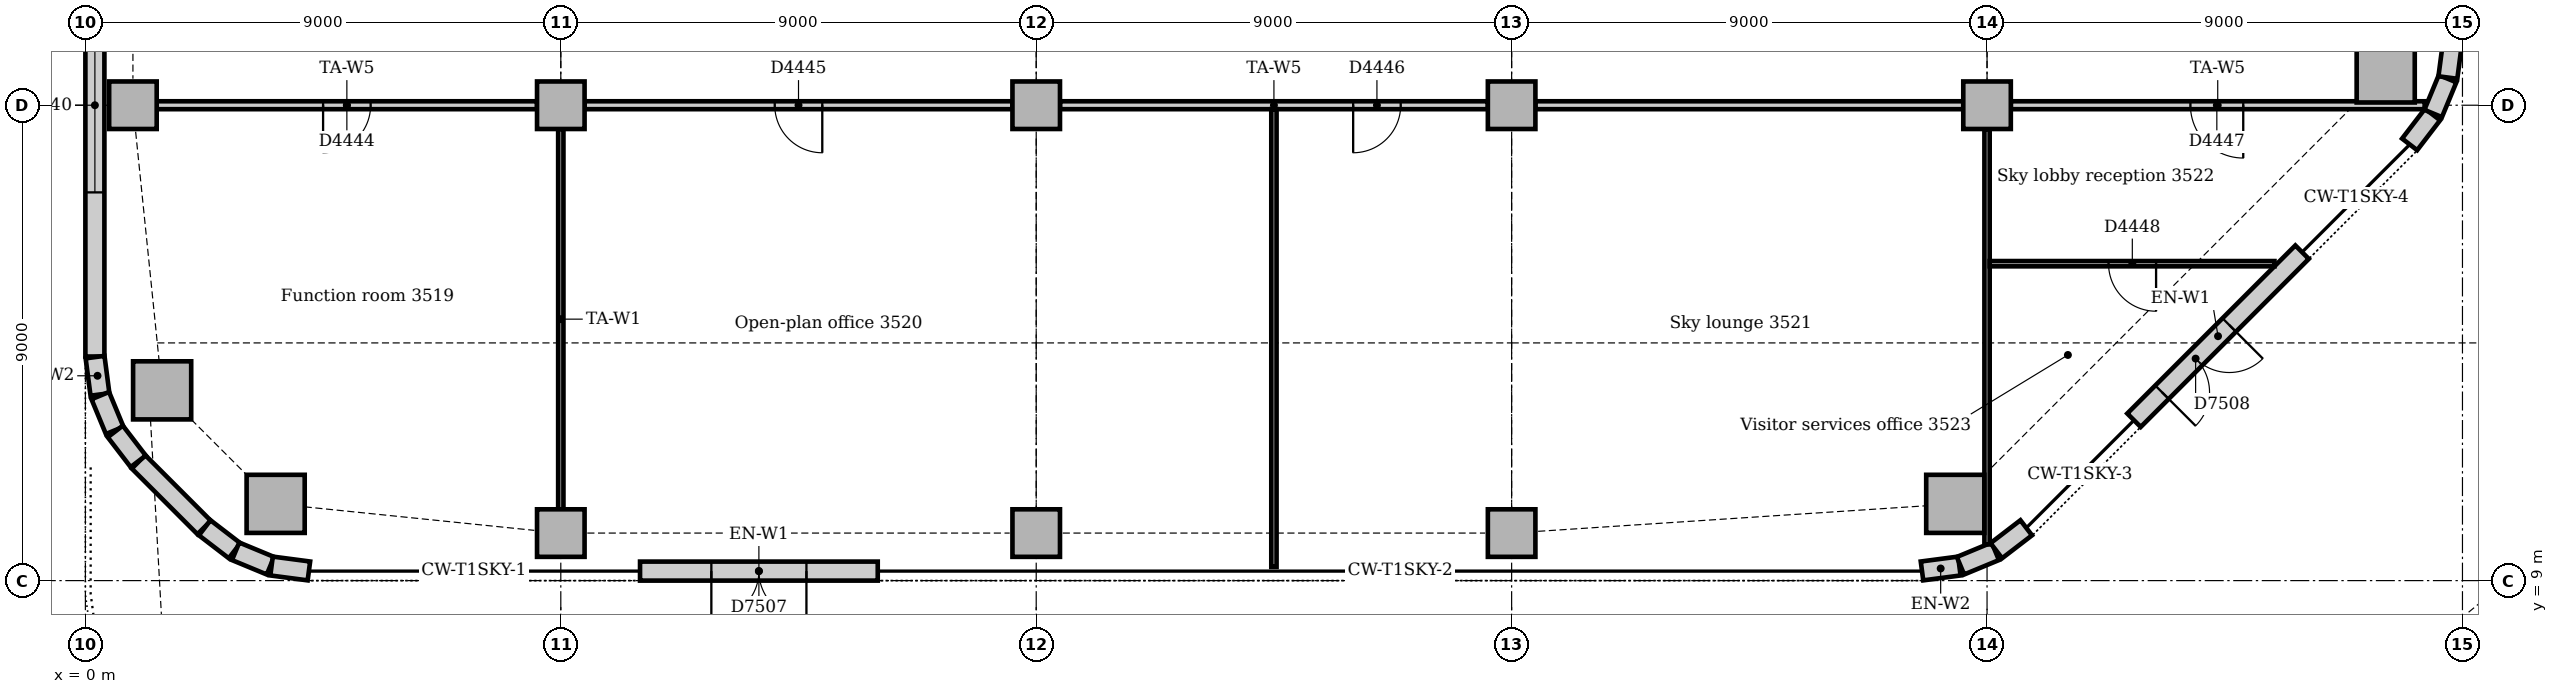
"""IFC4 building model, lengths in metres.
Left out: names, types, materials, properties, quantities, classifications, styles, units other than length and angle.
Written with IfcOpenShell. Run it as: python <this file> out.ifc"""

import sys

from ifc_helpers import new_model, si_unit, direction, frame, frame_2d, origin, origin_2d, place, context, subcontext, project, spatial, rectangle, extrude, element, fill, save


model = new_model("IFC4")
c1 = context("Model", 3, precision=1e-05, world=origin(), true_north=direction((0.0, 1.0)))
c2 = subcontext(c1, "Body", "Model", "MODEL_VIEW")
j1 = project(units=[si_unit("LENGTHUNIT", "METRE"), si_unit("PLANEANGLEUNIT", "RADIAN")], contexts=[c1])
p1 = place(None, origin())
s1 = spatial("IfcSite", under=j1, at=p1, CompositionType="ELEMENT")
p2 = place(p1, origin())
s2 = spatial("IfcBuilding", under=s1, at=p2, CompositionType="ELEMENT")
p3 = place(p2, frame((0.0, 0.0, 149.0)))
s3 = spatial("IfcBuildingStorey", under=s2, at=p3, CompositionType="ELEMENT", Elevation=149.0)
for number, where, z_axis, x_axis in (
    (1, (3.602, 10.453, -0.15), (0.0, 0.0, 1.0), (1.0, 0.0, 0.0)),
    (2, (35.398, 10.453, -0.15), (0.0, 0.0, 1.0), (1.0, 0.0, 0.0)),
    (3, (43.547, 18.602, -0.15), (0.0, 0.0, 1.0), (1.0, 0.0, 0.0)),
    (4, (1.453, 12.602, -0.15), (0.0, 0.0, 1.0), (1.0, 0.0, 0.0)),
):
    element("IfcColumn", number, at=place(p3, frame(where, z_axis=z_axis, x_axis=x_axis)), inside=s3, PredefinedType="COLUMN", context=c2, shape_type="SweptSolid", body=[
        extrude(rectangle(XDim=1.1, YDim=1.1, at=origin_2d()), origin(), (0.0, 0.0, 1.0), 4.0),
    ])
for number, where, z_axis, x_axis in (
    (5, (9.0, 9.9, -0.15), (0.0, 0.0, 1.0), (1.0, 0.0, 0.0)),
    (6, (18.0, 9.9, -0.15), (0.0, 0.0, 1.0), (1.0, 0.0, 0.0)),
    (7, (27.0, 9.9, -0.15), (0.0, 0.0, 1.0), (1.0, 0.0, 0.0)),
):
    element("IfcColumn", number, at=place(p3, frame(where, z_axis=z_axis, x_axis=x_axis)), inside=s3, PredefinedType="COLUMN", context=c2, shape_type="SweptSolid", body=[
        extrude(rectangle(XDim=0.9, YDim=0.9, at=origin_2d()), origin(), (0.0, 0.0, 1.0), 4.0),
    ])
for number, where, z_axis, x_axis in (
    (8, (0.9, 18.0, 0.0), (0.0, 0.0, 1.0), (1.0, 0.0, 0.0)),
    (9, (9.0, 18.0, 0.0), (0.0, 0.0, 1.0), (1.0, 0.0, 0.0)),
    (10, (18.0, 18.0, 0.0), (0.0, 0.0, 1.0), (1.0, 0.0, 0.0)),
    (11, (27.0, 18.0, 0.0), (0.0, 0.0, 1.0), (1.0, 0.0, 0.0)),
    (12, (36.0, 18.0, 0.0), (0.0, 0.0, 1.0), (1.0, 0.0, 0.0)),
):
    element("IfcColumn", number, at=place(p3, frame(where, z_axis=z_axis, x_axis=x_axis)), inside=s3, PredefinedType="COLUMN", context=c2, shape_type="SweptSolid", body=[
        extrude(rectangle(XDim=0.9, YDim=0.9, at=origin_2d()), origin(), (0.0, 0.0, 1.0), 3.85),
    ])
p4 = place(p3, frame((10.5, 9.18, 0.0), z_axis=(0.0, 0.0, 1.0), x_axis=(1.0, 0.0, 0.0)))
e13 = element("IfcWall", 13, at=p4, inside=s3, PredefinedType="STANDARD", context=c2, shape_type="SweptSolid", body=[
    extrude(rectangle(XDim=4.5, YDim=0.36, at=frame_2d((2.25, 0.0))), origin(), (0.0, 0.0, 1.0), 3.85),
])
p5 = place(p4, frame((1.35, 0.0, 0.0)))
e14 = element("IfcOpeningElement", 14, at=p5, cuts=e13, PredefinedType="OPENING", context=c2, shape_type="SweptSolid", body=[
    extrude(rectangle(XDim=1.8, YDim=2.4, at=frame_2d((0.9, 1.2))), frame((0.0, 0.19, 0.0), z_axis=(0.0, -1.0, 0.0), x_axis=(1.0, 0.0, 0.0)), (0.0, 0.0, 1.0), 0.38),
])
p6 = place(p3, frame((38.782, 12.036, 0.0), z_axis=(0.0, 0.0, 1.0), x_axis=(0.707106781187, 0.707106781187, 0.0)))
e15 = element("IfcWall", 15, at=p6, inside=s3, PredefinedType="STANDARD", context=c2, shape_type="SweptSolid", body=[
    extrude(rectangle(XDim=4.5, YDim=0.36, at=frame_2d((2.25, 0.0))), origin(), (0.0, 0.0, 1.0), 3.85),
])
p7 = place(p6, frame((0.75, 0.0, 0.0)))
e16 = element("IfcOpeningElement", 16, at=p7, cuts=e15, PredefinedType="OPENING", context=c2, shape_type="SweptSolid", body=[
    extrude(rectangle(XDim=1.8, YDim=2.4, at=frame_2d((0.9, 1.2))), frame((0.0, 0.19, 0.0), z_axis=(0.0, -1.0, 0.0), x_axis=(1.0, 0.0, 0.0)), (0.0, 0.0, 1.0), 0.38),
])
p8 = place(p3, frame((0.18, 21.0, 0.0), z_axis=(0.0, 0.0, 1.0), x_axis=(0.0, -1.0, 0.0)))
e17 = element("IfcWall", 17, at=p8, inside=s3, PredefinedType="STANDARD", context=c2, shape_type="SweptSolid", body=[
    extrude(rectangle(XDim=7.757, YDim=0.36, at=frame_2d((3.879, 0.0))), origin(), (0.0, 0.0, 1.0), 3.85),
])
p9 = place(p8, frame((1.35, 0.0, 0.9)))
e18 = element("IfcOpeningElement", 18, at=p9, cuts=e17, PredefinedType="OPENING", context=c2, shape_type="SweptSolid", body=[
    extrude(rectangle(XDim=3.3, YDim=1.6, at=frame_2d((1.65, 0.8))), frame((0.0, 0.19, 0.0), z_axis=(0.0, -1.0, 0.0), x_axis=(1.0, 0.0, 0.0)), (0.0, 0.0, 1.0), 0.38),
])
p10 = place(p3, frame((1.006, 11.249, 0.0), z_axis=(0.0, 0.0, 1.0), x_axis=(0.707106781187, -0.707106781187, 0.0)))
e19 = element("IfcWall", 19, at=p10, inside=s3, PredefinedType="STANDARD", context=c2, shape_type="SweptSolid", body=[
    extrude(rectangle(XDim=1.757, YDim=0.36, at=frame_2d((0.879, 0.0))), origin(), (0.0, 0.0, 1.0), 3.85),
])
for number, where, z_axis, x_axis in (
    (20, (34.769, 9.183, 0.0), (0.0, 0.0, 1.0), (0.991, 0.131, 0.0)),
    (21, (35.497, 9.282, 0.0), (0.0, 0.0, 1.0), (0.924, 0.383, 0.0)),
):
    element("IfcWall", number, at=place(p3, frame(where, z_axis=z_axis, x_axis=x_axis)), inside=s3, PredefinedType="STANDARD", context=c2, shape_type="SweptSolid", body=[
        extrude(rectangle(XDim=0.713, YDim=0.36, at=frame_2d((0.356, 0.0))), origin(), (0.0, 0.0, 1.0), 3.85),
    ])
for number, where, z_axis, x_axis in (
    (22, (36.175, 9.566, 0.0), (0.0, 0.0, 1.0), (0.793, 0.609, 0.0)),
    (23, (44.0, 17.259, 0.0), (0.0, 0.0, 1.0), (0.609, 0.793, 0.0)),
):
    element("IfcWall", number, at=place(p3, frame(where, z_axis=z_axis, x_axis=x_axis)), inside=s3, PredefinedType="STANDARD", context=c2, shape_type="SweptSolid", body=[
        extrude(rectangle(XDim=0.713, YDim=0.36, at=frame_2d((0.357, 0.0))), origin(), (0.0, 0.0, 1.0), 3.85),
    ])
for number, where, z_axis, x_axis in (
    (24, (44.445, 17.844, 0.0), (0.0, 0.0, 1.0), (0.383, 0.924, 0.0)),
    (25, (44.724, 18.524, 0.0), (0.0, 0.0, 1.0), (0.131, 0.991, 0.0)),
    (26, (0.183, 13.231, 0.0), (0.0, 0.0, 1.0), (0.131, -0.991, 0.0)),
    (27, (0.282, 12.503, 0.0), (0.0, 0.0, 1.0), (0.383, -0.924, 0.0)),
):
    element("IfcWall", number, at=place(p3, frame(where, z_axis=z_axis, x_axis=x_axis)), inside=s3, PredefinedType="STANDARD", context=c2, shape_type="SweptSolid", body=[
        extrude(rectangle(XDim=0.713, YDim=0.36, at=frame_2d((0.356, 0.0))), origin(), (0.0, 0.0, 1.0), 3.85),
    ])
for number, where, z_axis, x_axis in (
    (28, (0.566, 11.825, 0.0), (0.0, 0.0, 1.0), (0.609, -0.793, 0.0)),
    (29, (2.259, 10.0, 0.0), (0.0, 0.0, 1.0), (0.793, -0.609, 0.0)),
):
    element("IfcWall", number, at=place(p3, frame(where, z_axis=z_axis, x_axis=x_axis)), inside=s3, PredefinedType="STANDARD", context=c2, shape_type="SweptSolid", body=[
        extrude(rectangle(XDim=0.713, YDim=0.36, at=frame_2d((0.357, 0.0))), origin(), (0.0, 0.0, 1.0), 3.85),
    ])
for number, where, z_axis, x_axis in (
    (30, (2.844, 9.555, 0.0), (0.0, 0.0, 1.0), (0.924, -0.383, 0.0)),
    (31, (3.524, 9.276, 0.0), (0.0, 0.0, 1.0), (0.991, -0.131, 0.0)),
):
    element("IfcWall", number, at=place(p3, frame(where, z_axis=z_axis, x_axis=x_axis)), inside=s3, PredefinedType="STANDARD", context=c2, shape_type="SweptSolid", body=[
        extrude(rectangle(XDim=0.713, YDim=0.36, at=frame_2d((0.356, 0.0))), origin(), (0.0, 0.0, 1.0), 3.85),
    ])
p11 = place(p3, frame((1.35, 18.0, 0.0), z_axis=(0.0, 0.0, 1.0), x_axis=(1.0, 0.0, 0.0)))
e32 = element("IfcWall", 32, at=p11, inside=s3, PredefinedType="PARTITIONING", context=c2, shape_type="SweptSolid", body=[
    extrude(rectangle(XDim=7.2, YDim=0.15, at=frame_2d((3.6, 0.0))), origin(), (0.0, 0.0, 1.0), 3.262),
])
p12 = place(p11, frame((3.15, 0.0, 0.0)))
e33 = element("IfcOpeningElement", 33, at=p12, cuts=e32, PredefinedType="OPENING", context=c2, shape_type="SweptSolid", body=[
    extrude(rectangle(XDim=0.9, YDim=2.1, at=frame_2d((0.45, 1.05))), frame((0.0, 0.085, 0.0), z_axis=(0.0, -1.0, 0.0), x_axis=(1.0, 0.0, 0.0)), (0.0, 0.0, 1.0), 0.17),
])
p13 = place(p3, frame((9.45, 18.0, 0.0), z_axis=(0.0, 0.0, 1.0), x_axis=(1.0, 0.0, 0.0)))
e34 = element("IfcWall", 34, at=p13, inside=s3, PredefinedType="PARTITIONING", context=c2, shape_type="SweptSolid", body=[
    extrude(rectangle(XDim=8.1, YDim=0.15, at=frame_2d((4.05, 0.0))), origin(), (0.0, 0.0, 1.0), 3.262),
])
p14 = place(p13, frame((3.6, 0.0, 0.0)))
e35 = element("IfcOpeningElement", 35, at=p14, cuts=e34, PredefinedType="OPENING", context=c2, shape_type="SweptSolid", body=[
    extrude(rectangle(XDim=0.9, YDim=2.1, at=frame_2d((0.45, 1.05))), frame((0.0, 0.085, 0.0), z_axis=(0.0, -1.0, 0.0), x_axis=(1.0, 0.0, 0.0)), (0.0, 0.0, 1.0), 0.17),
])
p15 = place(p3, frame((18.45, 18.0, 0.0), z_axis=(0.0, 0.0, 1.0), x_axis=(1.0, 0.0, 0.0)))
e36 = element("IfcWall", 36, at=p15, inside=s3, PredefinedType="PARTITIONING", context=c2, shape_type="SweptSolid", body=[
    extrude(rectangle(XDim=8.1, YDim=0.15, at=frame_2d((4.05, 0.0))), origin(), (0.0, 0.0, 1.0), 3.262),
])
p16 = place(p15, frame((5.55, 0.0, 0.0)))
e37 = element("IfcOpeningElement", 37, at=p16, cuts=e36, PredefinedType="OPENING", context=c2, shape_type="SweptSolid", body=[
    extrude(rectangle(XDim=0.9, YDim=2.1, at=frame_2d((0.45, 1.05))), frame((0.0, 0.085, 0.0), z_axis=(0.0, -1.0, 0.0), x_axis=(1.0, 0.0, 0.0)), (0.0, 0.0, 1.0), 0.17),
])
p17 = place(p3, frame((27.45, 18.0, 0.0), z_axis=(0.0, 0.0, 1.0), x_axis=(1.0, 0.0, 0.0)))
e38 = element("IfcWall", 38, at=p17, inside=s3, PredefinedType="PARTITIONING", context=c2, shape_type="SweptSolid", body=[
    extrude(rectangle(XDim=8.1, YDim=0.15, at=frame_2d((4.05, 0.0))), origin(), (0.0, 0.0, 1.0), 3.262),
])
p18 = place(p3, frame((36.45, 18.0, 0.0), z_axis=(0.0, 0.0, 1.0), x_axis=(1.0, 0.0, 0.0)))
e39 = element("IfcWall", 39, at=p18, inside=s3, PredefinedType="PARTITIONING", context=c2, shape_type="SweptSolid", body=[
    extrude(rectangle(XDim=7.834, YDim=0.15, at=frame_2d((3.917, 0.0))), origin(), (0.0, 0.0, 1.0), 3.35),
])
p19 = place(p18, frame((3.4, 0.0, 0.0)))
e40 = element("IfcOpeningElement", 40, at=p19, cuts=e39, PredefinedType="OPENING", context=c2, shape_type="SweptSolid", body=[
    extrude(rectangle(XDim=1.0, YDim=2.1, at=frame_2d((0.5, 1.05))), frame((0.0, 0.085, 0.0), z_axis=(0.0, -1.0, 0.0), x_axis=(1.0, 0.0, 0.0)), (0.0, 0.0, 1.0), 0.17),
])
p20 = place(p3, frame((9.0, 10.35, 0.0), z_axis=(0.0, 0.0, 1.0), x_axis=(0.0, 1.0, 0.0)))
e41 = element("IfcWall", 41, at=p20, inside=s3, PredefinedType="PARTITIONING", context=c2, shape_type="SweptSolid", body=[
    extrude(rectangle(XDim=7.2, YDim=0.1, at=frame_2d((3.6, 0.0))), origin(), (0.0, 0.0, 1.0), 3.362),
])
p21 = place(p3, frame((22.5, 9.26, 0.0), z_axis=(0.0, 0.0, 1.0), x_axis=(0.0, 1.0, 0.0)))
e42 = element("IfcWall", 42, at=p21, inside=s3, PredefinedType="PARTITIONING", context=c2, shape_type="SweptSolid", body=[
    extrude(rectangle(XDim=8.665, YDim=0.1, at=frame_2d((4.332, 0.0))), origin(), (0.0, 0.0, 1.0), 3.85),
])
p22 = place(p3, frame((36.0, 9.685, 0.0), z_axis=(0.0, 0.0, 1.0), x_axis=(0.0, 1.0, 0.0)))
e43 = element("IfcWall", 43, at=p22, inside=s3, PredefinedType="PARTITIONING", context=c2, shape_type="SweptSolid", body=[
    extrude(rectangle(XDim=7.865, YDim=0.1, at=frame_2d((3.933, 0.0))), origin(), (0.0, 0.0, 1.0), 3.35),
])
p23 = place(p3, frame((36.05, 15.0, 0.0), z_axis=(0.0, 0.0, 1.0), x_axis=(1.0, 0.0, 0.0)))
e44 = element("IfcWall", 44, at=p23, inside=s3, PredefinedType="PARTITIONING", context=c2, shape_type="SweptSolid", body=[
    extrude(rectangle(XDim=5.391, YDim=0.1, at=frame_2d((2.696, 0.0))), origin(), (0.0, 0.0, 1.0), 3.85),
])
p24 = place(p23, frame((2.25, 0.0, 0.0)))
e45 = element("IfcOpeningElement", 45, at=p24, cuts=e44, PredefinedType="OPENING", context=c2, shape_type="SweptSolid", body=[
    extrude(rectangle(XDim=0.9, YDim=2.1, at=frame_2d((0.45, 1.05))), frame((0.0, 0.06, 0.0), z_axis=(0.0, -1.0, 0.0), x_axis=(1.0, 0.0, 0.0)), (0.0, 0.0, 1.0), 0.12),
])
p25 = place(p5, frame((1.8, 0.0, 0.0), z_axis=(0.0, 0.0, 1.0), x_axis=(-1.0, 0.0, 0.0)))
e46 = element("IfcDoor", 46, at=p25, inside=s3, OperationType="DOUBLE_DOOR_SINGLE_SWING", PredefinedType="DOOR", context=c2, shape_type="SweptSolid", body=[
    extrude(rectangle(XDim=1.8, YDim=2.4, at=frame_2d((0.9, 1.2))), frame((0.0, -0.07, 0.0), z_axis=(0.0, -1.0, 0.0), x_axis=(1.0, 0.0, 0.0)), (0.0, 0.0, 1.0), 0.05),
])
fill(e14, e46)
p26 = place(p7, frame((1.8, 0.0, 0.0), z_axis=(0.0, 0.0, 1.0), x_axis=(-1.0, 0.0, 0.0)))
e47 = element("IfcDoor", 47, at=p26, inside=s3, OperationType="DOUBLE_DOOR_SINGLE_SWING", PredefinedType="DOOR", context=c2, shape_type="SweptSolid", body=[
    extrude(rectangle(XDim=1.8, YDim=2.4, at=frame_2d((0.9, 1.2))), frame((0.0, -0.07, 0.0), z_axis=(0.0, -1.0, 0.0), x_axis=(1.0, 0.0, 0.0)), (0.0, 0.0, 1.0), 0.05),
])
fill(e16, e47)
p27 = place(p9, origin())
e48 = element("IfcWindow", 48, at=p27, inside=s3, PartitioningType="SINGLE_PANEL", PredefinedType="WINDOW", context=c2, shape_type="SweptSolid", body=[
    extrude(rectangle(XDim=3.3, YDim=1.6, at=frame_2d((1.65, 0.8))), frame((0.0, 0.13, 0.0), z_axis=(0.0, -1.0, 0.0), x_axis=(1.0, 0.0, 0.0)), (0.0, 0.0, 1.0), 0.06),
])
fill(e18, e48)
p28 = place(p12, frame((0.9, 0.0, 0.0), z_axis=(0.0, 0.0, 1.0), x_axis=(-1.0, 0.0, 0.0)))
e49 = element("IfcDoor", 49, at=p28, inside=s3, OperationType="SINGLE_SWING_RIGHT", PredefinedType="DOOR", context=c2, shape_type="SweptSolid", body=[
    extrude(rectangle(XDim=0.9, YDim=2.1, at=frame_2d((0.45, 1.05))), frame((0.0, 0.025, 0.0), z_axis=(0.0, -1.0, 0.0), x_axis=(1.0, 0.0, 0.0)), (0.0, 0.0, 1.0), 0.05),
])
fill(e33, e49)
p29 = place(p14, frame((0.9, 0.0, 0.0), z_axis=(0.0, 0.0, 1.0), x_axis=(-1.0, 0.0, 0.0)))
e50 = element("IfcDoor", 50, at=p29, inside=s3, OperationType="SINGLE_SWING_LEFT", PredefinedType="DOOR", context=c2, shape_type="SweptSolid", body=[
    extrude(rectangle(XDim=0.9, YDim=2.1, at=frame_2d((0.45, 1.05))), frame((0.0, 0.025, 0.0), z_axis=(0.0, -1.0, 0.0), x_axis=(1.0, 0.0, 0.0)), (0.0, 0.0, 1.0), 0.05),
])
fill(e35, e50)
p30 = place(p16, frame((0.9, 0.0, 0.0), z_axis=(0.0, 0.0, 1.0), x_axis=(-1.0, 0.0, 0.0)))
e51 = element("IfcDoor", 51, at=p30, inside=s3, OperationType="SINGLE_SWING_RIGHT", PredefinedType="DOOR", context=c2, shape_type="SweptSolid", body=[
    extrude(rectangle(XDim=0.9, YDim=2.1, at=frame_2d((0.45, 1.05))), frame((0.0, 0.025, 0.0), z_axis=(0.0, -1.0, 0.0), x_axis=(1.0, 0.0, 0.0)), (0.0, 0.0, 1.0), 0.05),
])
fill(e37, e51)
p31 = place(p19, frame((1.0, 0.0, 0.0), z_axis=(0.0, 0.0, 1.0), x_axis=(-1.0, 0.0, 0.0)))
e52 = element("IfcDoor", 52, at=p31, inside=s3, OperationType="SINGLE_SWING_LEFT", PredefinedType="DOOR", context=c2, shape_type="SweptSolid", body=[
    extrude(rectangle(XDim=1.0, YDim=2.1, at=frame_2d((0.5, 1.05))), frame((0.0, 0.025, 0.0), z_axis=(0.0, -1.0, 0.0), x_axis=(1.0, 0.0, 0.0)), (0.0, 0.0, 1.0), 0.05),
])
fill(e40, e52)
p32 = place(p24, frame((0.9, 0.0, 0.0), z_axis=(0.0, 0.0, 1.0), x_axis=(-1.0, 0.0, 0.0)))
e53 = element("IfcDoor", 53, at=p32, inside=s3, OperationType="SINGLE_SWING_LEFT", PredefinedType="DOOR", context=c2, shape_type="SweptSolid", body=[
    extrude(rectangle(XDim=0.9, YDim=2.1, at=frame_2d((0.45, 1.05))), frame((0.0, 0.025, 0.0), z_axis=(0.0, -1.0, 0.0), x_axis=(1.0, 0.0, 0.0)), (0.0, 0.0, 1.0), 0.05),
])
fill(e45, e53)
save(model, sys.argv[1])
